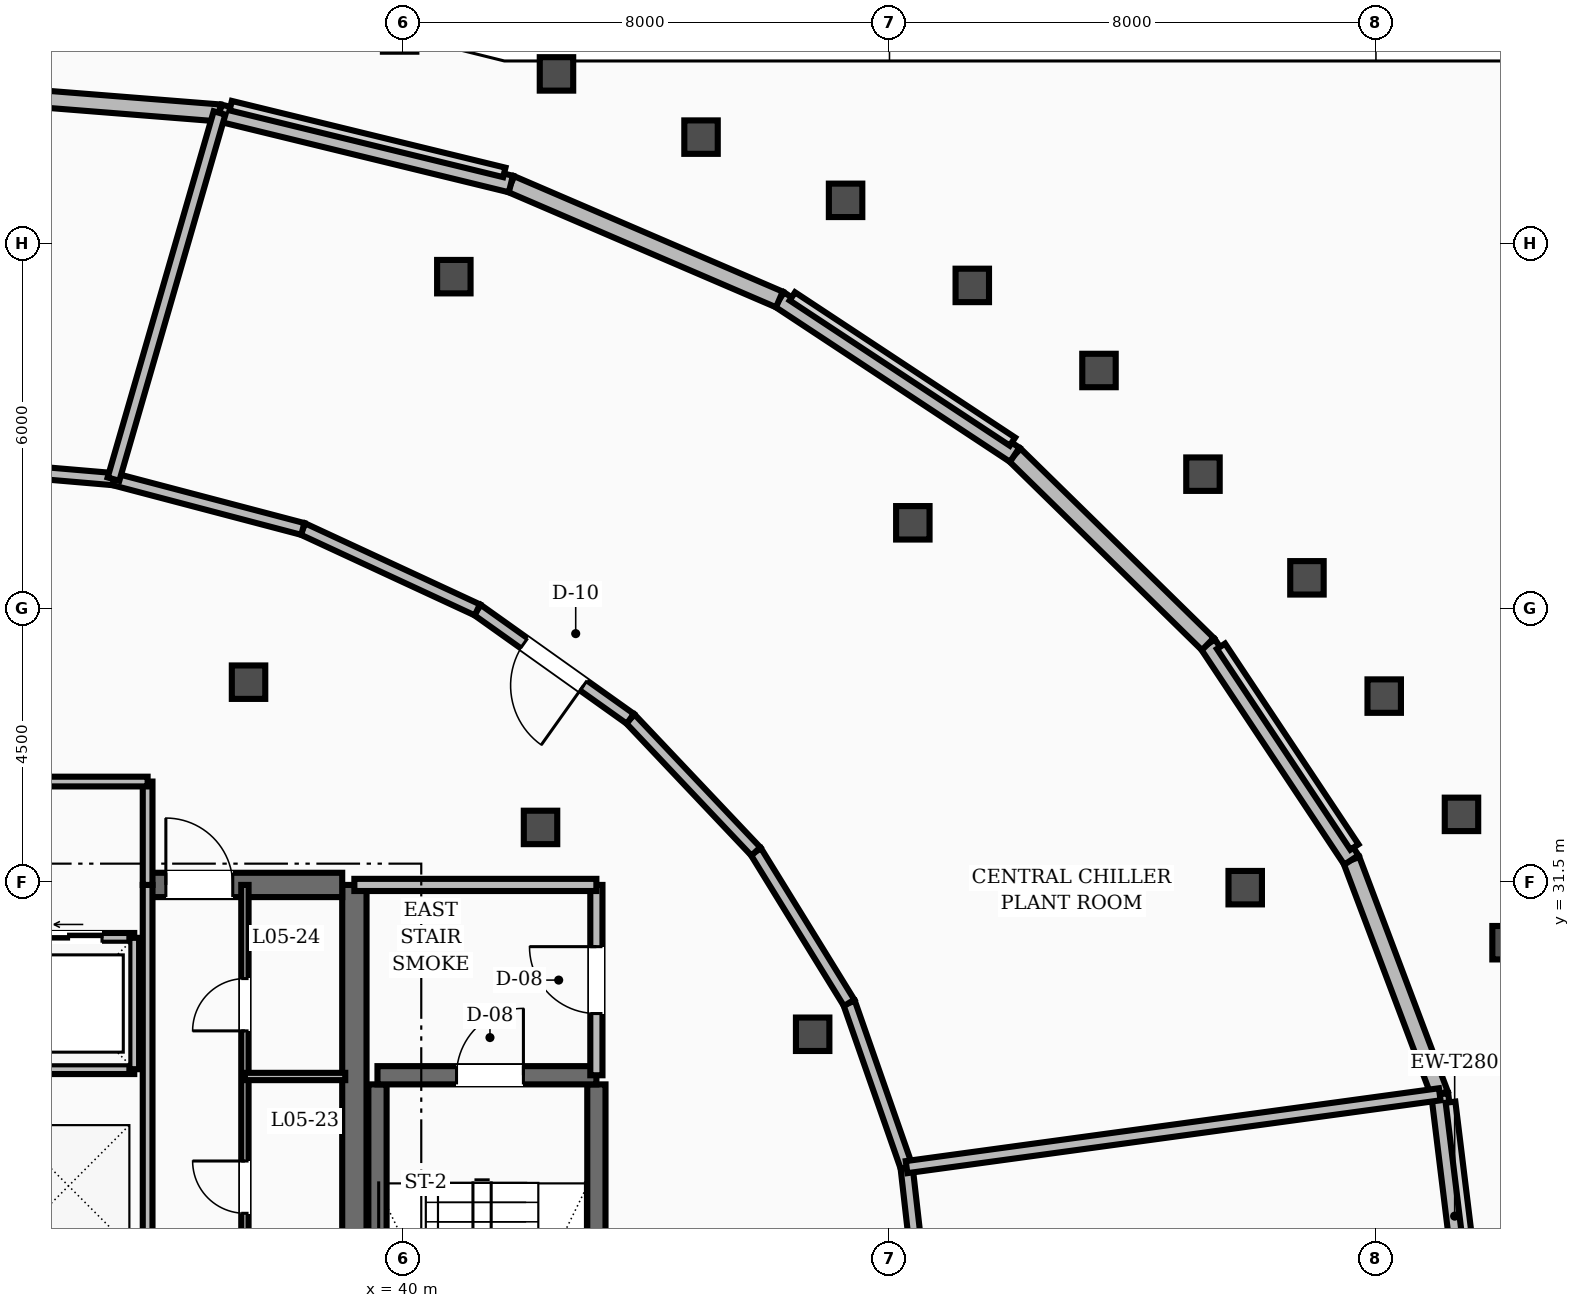
"""IFC4 building model, lengths in metres.
Left out: names, types, materials, properties, quantities, classifications, styles, units other than length and angle.
Written with IfcOpenShell. Run it as: python <this file> out.ifc"""

import sys

from ifc_helpers import new_model, si_unit, direction, frame, frame_2d, origin, place, context, subcontext, project, spatial, rectangle, extrude, element, fill, save


model = new_model("IFC4")
c1 = context("Model", 3, precision=1e-05, world=origin(), true_north=direction((0.0, 1.0)))
c2 = subcontext(c1, "Body", "Model", "MODEL_VIEW")
j1 = project(units=[si_unit("LENGTHUNIT", "METRE"), si_unit("PLANEANGLEUNIT", "RADIAN")], contexts=[c1])
p1 = place(None, origin())
s1 = spatial("IfcSite", under=j1, at=p1, CompositionType="ELEMENT")
p2 = place(p1, origin())
s2 = spatial("IfcBuilding", under=s1, at=p2, CompositionType="ELEMENT")
p3 = place(p2, frame((0.0, 0.0, 24.4)))
s3 = spatial("IfcBuildingStorey", under=s2, at=p3, CompositionType="ELEMENT", Elevation=24.4)
p4 = place(p3, frame((39.2, 25.15, 0.0), z_axis=(0.0, 0.0, 1.0), x_axis=(0.0, 1.0, 0.0)))
e1 = element("IfcWall", 1, at=p4, inside=s3, PredefinedType="SHEAR", context=c2, shape_type="SweptSolid", body=[
    extrude(rectangle(XDim=6.3, YDim=0.4, at=frame_2d((3.15, 0.0))), origin(), (0.0, 0.0, 1.0), 6.0),
])
p5 = place(p3, frame((35.8, 31.45, 0.0), z_axis=(0.0, 0.0, 1.0), x_axis=(1.0, 0.0, 0.0)))
e2 = element("IfcWall", 2, at=p5, inside=s3, PredefinedType="SHEAR", context=c2, shape_type="SweptSolid", body=[
    extrude(rectangle(XDim=3.2, YDim=0.4, at=frame_2d((1.6, 0.0))), origin(), (0.0, 0.0, 1.0), 6.0),
])
p6 = place(p5, frame((0.3, 0.0, 0.0)))
e3 = element("IfcOpeningElement", 3, at=p6, cuts=e2, PredefinedType="OPENING", context=c2, shape_type="SweptSolid", body=[
    extrude(rectangle(XDim=1.1, YDim=2.1, at=frame_2d((0.55, 1.05))), frame((0.0, 0.21, 0.0), z_axis=(0.0, -1.0, 0.0), x_axis=(1.0, 0.0, 0.0)), (0.0, 0.0, 1.0), 0.42),
])
for number, where, z_axis, x_axis in (
    (4, (43.18, 19.43, 0.0), (0.0, 0.0, 1.0), (0.0, 1.0, 0.0)),
    (5, (39.58, 19.43, 0.0), (0.0, 0.0, 1.0), (0.0, 1.0, 0.0)),
):
    element("IfcWall", number, at=place(p3, frame(where, z_axis=z_axis, x_axis=x_axis)), inside=s3, PredefinedType="SHEAR", context=c2, shape_type="SweptSolid", body=[
        extrude(rectangle(XDim=8.74, YDim=0.3, at=frame_2d((4.37, 0.0))), origin(), (0.0, 0.0, 1.0), 6.0),
    ])
p7 = place(p3, frame((39.58, 28.32, 0.0), z_axis=(0.0, 0.0, 1.0), x_axis=(1.0, 0.0, 0.0)))
e6 = element("IfcWall", 6, at=p7, inside=s3, PredefinedType="SHEAR", context=c2, shape_type="SweptSolid", body=[
    extrude(rectangle(XDim=3.6, YDim=0.3, at=frame_2d((1.8, 0.0))), origin(), (0.0, 0.0, 1.0), 6.0),
])
p8 = place(p7, frame((1.3, 0.0, 0.0)))
e7 = element("IfcOpeningElement", 7, at=p8, cuts=e6, PredefinedType="OPENING", context=c2, shape_type="SweptSolid", body=[
    extrude(rectangle(XDim=1.1, YDim=2.1, at=frame_2d((0.55, 1.05))), frame((0.0, 0.16, 0.0), z_axis=(0.0, -1.0, 0.0), x_axis=(1.0, 0.0, 0.0)), (0.0, 0.0, 1.0), 0.32),
])
p9 = place(p3, frame((57.54, 24.0, 0.0), z_axis=(0.0, 0.0, 1.0), x_axis=(-0.121555781987, 0.992584601868, 0.0)))
e8 = element("IfcWall", 8, at=p9, inside=s3, PredefinedType="STANDARD", context=c2, shape_type="SweptSolid", body=[
    extrude(rectangle(XDim=4.037, YDim=0.28, at=frame_2d((2.019, 0.0))), origin(), (0.0, 0.0, 1.0), 4.71),
])
p10 = place(p3, frame((57.049, 28.007, 0.0), z_axis=(0.0, 0.0, 1.0), x_axis=(-0.352909401731, 0.935657498324, 0.0)))
e9 = element("IfcWall", 9, at=p10, inside=s3, PredefinedType="STANDARD", context=c2, shape_type="SweptSolid", body=[
    extrude(rectangle(XDim=4.118, YDim=0.28, at=frame_2d((2.059, 0.0))), origin(), (0.0, 0.0, 1.0), 4.71),
])
p11 = place(p3, frame((55.596, 31.86, 0.0), z_axis=(0.0, 0.0, 1.0), x_axis=(-0.55356334222, 0.832807076189, 0.0)))
e10 = element("IfcWall", 10, at=p11, inside=s3, PredefinedType="STANDARD", context=c2, shape_type="SweptSolid", body=[
    extrude(rectangle(XDim=4.264, YDim=0.28, at=frame_2d((2.132, 0.0))), origin(), (0.0, 0.0, 1.0), 4.71),
])
p12 = place(p3, frame((53.236, 35.411, 0.0), z_axis=(0.0, 0.0, 1.0), x_axis=(-0.714207899037, 0.699933623248, 0.0)))
e11 = element("IfcWall", 11, at=p12, inside=s3, PredefinedType="STANDARD", context=c2, shape_type="SweptSolid", body=[
    extrude(rectangle(XDim=4.447, YDim=0.28, at=frame_2d((2.224, 0.0))), origin(), (0.0, 0.0, 1.0), 4.71),
])
p13 = place(p3, frame((50.06, 38.524, 0.0), z_axis=(0.0, 0.0, 1.0), x_axis=(-0.834608922487, 0.550842941776, 0.0)))
e12 = element("IfcWall", 12, at=p13, inside=s3, PredefinedType="STANDARD", context=c2, shape_type="SweptSolid", body=[
    extrude(rectangle(XDim=4.637, YDim=0.28, at=frame_2d((2.319, 0.0))), origin(), (0.0, 0.0, 1.0), 4.71),
])
p14 = place(p3, frame((46.189, 41.078, 0.0), z_axis=(0.0, 0.0, 1.0), x_axis=(-0.918705683067, 0.394942866629, 0.0)))
e13 = element("IfcWall", 13, at=p14, inside=s3, PredefinedType="STANDARD", context=c2, shape_type="SweptSolid", body=[
    extrude(rectangle(XDim=4.806, YDim=0.28, at=frame_2d((2.403, 0.0))), origin(), (0.0, 0.0, 1.0), 4.71),
])
p15 = place(p3, frame((41.774, 42.977, 0.0), z_axis=(0.0, 0.0, 1.0), x_axis=(-0.97151283312, 0.236986951292, 0.0)))
e14 = element("IfcWall", 14, at=p15, inside=s3, PredefinedType="STANDARD", context=c2, shape_type="SweptSolid", body=[
    extrude(rectangle(XDim=4.931, YDim=0.28, at=frame_2d((2.466, 0.0))), origin(), (0.0, 0.0, 1.0), 4.71),
])
p16 = place(p3, frame((36.983, 44.145, 0.0), z_axis=(0.0, 0.0, 1.0), x_axis=(-0.996876023292, 0.078982239682, 0.0)))
e15 = element("IfcWall", 15, at=p16, inside=s3, PredefinedType="STANDARD", context=c2, shape_type="SweptSolid", body=[
    extrude(rectangle(XDim=4.998, YDim=0.28, at=frame_2d((2.499, 0.0))), origin(), (0.0, 0.0, 1.0), 4.71),
])
p17 = place(p3, frame((43.18, 28.32, 0.0), z_axis=(0.0, 0.0, 1.0), x_axis=(0.0, 1.0, 0.0)))
e16 = element("IfcWall", 16, at=p17, inside=s3, PredefinedType="SOLIDWALL", context=c2, shape_type="SweptSolid", body=[
    extrude(rectangle(XDim=3.13, YDim=0.2, at=frame_2d((1.565, 0.0))), origin(), (0.0, 0.0, 1.0), 4.71),
])
p18 = place(p17, frame((1.015, 0.0, 0.0)))
e17 = element("IfcOpeningElement", 17, at=p18, cuts=e16, PredefinedType="OPENING", context=c2, shape_type="SweptSolid", body=[
    extrude(rectangle(XDim=1.1, YDim=2.1, at=frame_2d((0.55, 1.05))), frame((0.0, 0.11, 0.0), z_axis=(0.0, -1.0, 0.0), x_axis=(1.0, 0.0, 0.0)), (0.0, 0.0, 1.0), 0.22),
])
p19 = place(p3, frame((39.2, 31.45, 0.0), z_axis=(0.0, 0.0, 1.0), x_axis=(1.0, 0.0, 0.0)))
e18 = element("IfcWall", 18, at=p19, inside=s3, PredefinedType="SOLIDWALL", context=c2, shape_type="SweptSolid", body=[
    extrude(rectangle(XDim=3.98, YDim=0.2, at=frame_2d((1.99, 0.0))), origin(), (0.0, 0.0, 1.0), 4.71),
])
p20 = place(p3, frame((35.8, 25.25, 0.0), z_axis=(0.0, 0.0, 1.0), x_axis=(0.0, 1.0, 0.0)))
e19 = element("IfcWall", 19, at=p20, inside=s3, PredefinedType="SOLIDWALL", context=c2, shape_type="SweptSolid", body=[
    extrude(rectangle(XDim=6.2, YDim=0.16, at=frame_2d((3.1, 0.0))), origin(), (0.0, 0.0, 1.0), 4.71),
])
p21 = place(p3, frame((28.42, 30.58, 0.0), z_axis=(0.0, 0.0, 1.0), x_axis=(1.0, 0.0, 0.0)))
e20 = element("IfcWall", 20, at=p21, inside=s3, PredefinedType="SOLIDWALL", context=c2, shape_type="SweptSolid", body=[
    extrude(rectangle(XDim=7.16, YDim=0.16, at=frame_2d((3.58, 0.0))), origin(), (0.0, 0.0, 1.0), 4.71),
])
p22 = place(p21, frame((0.53, 0.0, 0.0)))
e21 = element("IfcOpeningElement", 21, at=p22, cuts=e20, PredefinedType="OPENING", context=c2, shape_type="SweptSolid", body=[
    extrude(rectangle(XDim=1.1, YDim=2.15, at=frame_2d((0.55, 1.075))), frame((0.0, 0.09, 0.0), z_axis=(0.0, -1.0, 0.0), x_axis=(1.0, 0.0, 0.0)), (0.0, 0.0, 1.0), 0.18),
])
p23 = place(p21, frame((3.03, 0.0, 0.0)))
e22 = element("IfcOpeningElement", 22, at=p23, cuts=e20, PredefinedType="OPENING", context=c2, shape_type="SweptSolid", body=[
    extrude(rectangle(XDim=1.1, YDim=2.15, at=frame_2d((0.55, 1.075))), frame((0.0, 0.09, 0.0), z_axis=(0.0, -1.0, 0.0), x_axis=(1.0, 0.0, 0.0)), (0.0, 0.0, 1.0), 0.18),
])
p24 = place(p21, frame((5.53, 0.0, 0.0)))
e23 = element("IfcOpeningElement", 23, at=p24, cuts=e20, PredefinedType="OPENING", context=c2, shape_type="SweptSolid", body=[
    extrude(rectangle(XDim=1.1, YDim=2.15, at=frame_2d((0.55, 1.075))), frame((0.0, 0.09, 0.0), z_axis=(0.0, -1.0, 0.0), x_axis=(1.0, 0.0, 0.0)), (0.0, 0.0, 1.0), 0.18),
])
p25 = place(p3, frame((28.42, 28.42, 0.0), z_axis=(0.0, 0.0, 1.0), x_axis=(1.0, 0.0, 0.0)))
e24 = element("IfcWall", 24, at=p25, inside=s3, PredefinedType="SOLIDWALL", context=c2, shape_type="SweptSolid", body=[
    extrude(rectangle(XDim=7.16, YDim=0.16, at=frame_2d((3.58, 0.0))), origin(), (0.0, 0.0, 1.0), 4.71),
])
p26 = place(p3, frame((35.58, 28.42, 0.0), z_axis=(0.0, 0.0, 1.0), x_axis=(0.0, 1.0, 0.0)))
e25 = element("IfcWall", 25, at=p26, inside=s3, PredefinedType="SOLIDWALL", context=c2, shape_type="SweptSolid", body=[
    extrude(rectangle(XDim=2.16, YDim=0.16, at=frame_2d((1.08, 0.0))), origin(), (0.0, 0.0, 1.0), 4.71),
])
p27 = place(p3, frame((35.8, 31.45, 0.0), z_axis=(0.0, 0.0, 1.0), x_axis=(0.0, 1.0, 0.0)))
e26 = element("IfcWall", 26, at=p27, inside=s3, PredefinedType="SOLIDWALL", context=c2, shape_type="SweptSolid", body=[
    extrude(rectangle(XDim=1.7, YDim=0.16, at=frame_2d((0.85, 0.0))), origin(), (0.0, 0.0, 1.0), 4.71),
])
p28 = place(p3, frame((28.2, 33.15, 0.0), z_axis=(0.0, 0.0, 1.0), x_axis=(1.0, 0.0, 0.0)))
e27 = element("IfcWall", 27, at=p28, inside=s3, PredefinedType="SOLIDWALL", context=c2, shape_type="SweptSolid", body=[
    extrude(rectangle(XDim=7.6, YDim=0.16, at=frame_2d((3.8, 0.0))), origin(), (0.0, 0.0, 1.0), 4.71),
])
p29 = place(p28, frame((3.2, 0.0, 0.0)))
e28 = element("IfcOpeningElement", 28, at=p29, cuts=e27, PredefinedType="OPENING", context=c2, shape_type="SweptSolid", body=[
    extrude(rectangle(XDim=1.2, YDim=2.1, at=frame_2d((0.6, 1.05))), frame((0.0, 0.09, 0.0), z_axis=(0.0, -1.0, 0.0), x_axis=(1.0, 0.0, 0.0)), (0.0, 0.0, 1.0), 0.18),
])
p30 = place(p3, frame((37.4, 25.25, 0.0), z_axis=(0.0, 0.0, 1.0), x_axis=(0.0, 1.0, 0.0)))
e29 = element("IfcWall", 29, at=p30, inside=s3, PredefinedType="PARTITIONING", context=c2, shape_type="SweptSolid", body=[
    extrude(rectangle(XDim=6.2, YDim=0.12, at=frame_2d((3.1, 0.0))), origin(), (0.0, 0.0, 1.0), 4.71),
])
p31 = place(p30, frame((0.8, 0.0, 0.0)))
e30 = element("IfcOpeningElement", 30, at=p31, cuts=e29, PredefinedType="OPENING", context=c2, shape_type="SweptSolid", body=[
    extrude(rectangle(XDim=0.86, YDim=2.1, at=frame_2d((0.43, 1.05))), frame((0.0, 0.07, 0.0), z_axis=(0.0, -1.0, 0.0), x_axis=(1.0, 0.0, 0.0)), (0.0, 0.0, 1.0), 0.14),
])
p32 = place(p30, frame((3.8, 0.0, 0.0)))
e31 = element("IfcOpeningElement", 31, at=p32, cuts=e29, PredefinedType="OPENING", context=c2, shape_type="SweptSolid", body=[
    extrude(rectangle(XDim=0.86, YDim=2.1, at=frame_2d((0.43, 1.05))), frame((0.0, 0.07, 0.0), z_axis=(0.0, -1.0, 0.0), x_axis=(1.0, 0.0, 0.0)), (0.0, 0.0, 1.0), 0.14),
])
p33 = place(p3, frame((37.4, 28.3, 0.0), z_axis=(0.0, 0.0, 1.0), x_axis=(1.0, 0.0, 0.0)))
e32 = element("IfcWall", 32, at=p33, inside=s3, PredefinedType="PARTITIONING", context=c2, shape_type="SweptSolid", body=[
    extrude(rectangle(XDim=1.65, YDim=0.12, at=frame_2d((0.825, 0.0))), origin(), (0.0, 0.0, 1.0), 4.71),
])
p34 = place(p3, frame((48.6, 24.0, 0.0), z_axis=(0.0, 0.0, 1.0), x_axis=(-0.112857376865, 0.993611197847, 0.0)))
e33 = element("IfcWall", 33, at=p34, inside=s3, PredefinedType="SOLIDWALL", context=c2, shape_type="SweptSolid", body=[
    extrude(rectangle(XDim=2.827, YDim=0.2, at=frame_2d((1.414, 0.0))), origin(), (0.0, 0.0, 1.0), 4.71),
])
p35 = place(p3, frame((48.281, 26.809, 0.0), z_axis=(0.0, 0.0, 1.0), x_axis=(-0.330091990738, 0.943948768552, 0.0)))
e34 = element("IfcWall", 34, at=p35, inside=s3, PredefinedType="SOLIDWALL", context=c2, shape_type="SweptSolid", body=[
    extrude(rectangle(XDim=2.862, YDim=0.2, at=frame_2d((1.431, 0.0))), origin(), (0.0, 0.0, 1.0), 4.71),
])
p36 = place(p3, frame((47.336, 29.51, 0.0), z_axis=(0.0, 0.0, 1.0), x_axis=(-0.524539864295, 0.851385888282, 0.0)))
e35 = element("IfcWall", 35, at=p36, inside=s3, PredefinedType="SOLIDWALL", context=c2, shape_type="SweptSolid", body=[
    extrude(rectangle(XDim=2.924, YDim=0.2, at=frame_2d((1.462, 0.0))), origin(), (0.0, 0.0, 1.0), 4.71),
])
p37 = place(p3, frame((45.802, 32.0, 0.0), z_axis=(0.0, 0.0, 1.0), x_axis=(-0.687248541225, 0.726422358263, 0.0)))
e36 = element("IfcWall", 36, at=p37, inside=s3, PredefinedType="SOLIDWALL", context=c2, shape_type="SweptSolid", body=[
    extrude(rectangle(XDim=3.004, YDim=0.2, at=frame_2d((1.502, 0.0))), origin(), (0.0, 0.0, 1.0), 4.71),
])
p38 = place(p3, frame((43.738, 34.182, 0.0), z_axis=(0.0, 0.0, 1.0), x_axis=(-0.814667287654, 0.579928625286, 0.0)))
e37 = element("IfcWall", 37, at=p38, inside=s3, PredefinedType="SOLIDWALL", context=c2, shape_type="SweptSolid", body=[
    extrude(rectangle(XDim=3.088, YDim=0.2, at=frame_2d((1.544, 0.0))), origin(), (0.0, 0.0, 1.0), 4.71),
])
p39 = place(p38, frame((0.944, 0.0, 0.0)))
e38 = element("IfcOpeningElement", 38, at=p39, cuts=e37, PredefinedType="OPENING", context=c2, shape_type="SweptSolid", body=[
    extrude(rectangle(XDim=1.2, YDim=2.1, at=frame_2d((0.6, 1.05))), frame((0.0, 0.11, 0.0), z_axis=(0.0, -1.0, 0.0), x_axis=(1.0, 0.0, 0.0)), (0.0, 0.0, 1.0), 0.22),
])
p40 = place(p3, frame((41.222, 35.973, 0.0), z_axis=(0.0, 0.0, 1.0), x_axis=(-0.907205736671, 0.420687236971, 0.0)))
e39 = element("IfcWall", 39, at=p40, inside=s3, PredefinedType="SOLIDWALL", context=c2, shape_type="SweptSolid", body=[
    extrude(rectangle(XDim=3.163, YDim=0.2, at=frame_2d((1.582, 0.0))), origin(), (0.0, 0.0, 1.0), 4.71),
])
p41 = place(p3, frame((38.353, 37.304, 0.0), z_axis=(0.0, 0.0, 1.0), x_axis=(-0.967085339773, 0.2544522462, 0.0)))
e40 = element("IfcWall", 40, at=p41, inside=s3, PredefinedType="SOLIDWALL", context=c2, shape_type="SweptSolid", body=[
    extrude(rectangle(XDim=3.22, YDim=0.2, at=frame_2d((1.61, 0.0))), origin(), (0.0, 0.0, 1.0), 4.71),
])
p42 = place(p3, frame((35.239, 38.123, 0.0), z_axis=(0.0, 0.0, 1.0), x_axis=(-0.996372169556, 0.085102877354, 0.0)))
e41 = element("IfcWall", 41, at=p42, inside=s3, PredefinedType="SOLIDWALL", context=c2, shape_type="SweptSolid", body=[
    extrude(rectangle(XDim=3.25, YDim=0.2, at=frame_2d((1.625, 0.0))), origin(), (0.0, 0.0, 1.0), 4.71),
])
p43 = place(p3, frame((48.281, 26.809, 0.0), z_axis=(0.0, 0.0, 1.0), x_axis=(0.990798748828, 0.13534341255, 0.0)))
e42 = element("IfcWall", 42, at=p43, inside=s3, PredefinedType="SOLIDWALL", context=c2, shape_type="SweptSolid", body=[
    extrude(rectangle(XDim=8.85, YDim=0.2, at=frame_2d((4.425, 0.0))), origin(), (0.0, 0.0, 1.0), 4.71),
])
p44 = place(p3, frame((35.239, 38.123, 0.0), z_axis=(0.0, 0.0, 1.0), x_axis=(0.278196122184, 0.960524293083, 0.0)))
e43 = element("IfcWall", 43, at=p44, inside=s3, PredefinedType="SOLIDWALL", context=c2, shape_type="SweptSolid", body=[
    extrude(rectangle(XDim=6.27, YDim=0.2, at=frame_2d((3.135, 0.0))), origin(), (0.0, 0.0, 1.0), 4.71),
])
p45 = place(p8, origin())
e44 = element("IfcDoor", 44, at=p45, inside=s3, OperationType="SINGLE_SWING_RIGHT", PredefinedType="DOOR", context=c2, shape_type="SweptSolid", body=[
    extrude(rectangle(XDim=1.1, YDim=2.1, at=frame_2d((0.55, 1.05))), frame((0.0, 0.025, 0.0), z_axis=(0.0, -1.0, 0.0), x_axis=(1.0, 0.0, 0.0)), (0.0, 0.0, 1.0), 0.05),
])
fill(e7, e44)
p46 = place(p18, origin())
e45 = element("IfcDoor", 45, at=p46, inside=s3, OperationType="SINGLE_SWING_RIGHT", PredefinedType="DOOR", context=c2, shape_type="SweptSolid", body=[
    extrude(rectangle(XDim=1.1, YDim=2.1, at=frame_2d((0.55, 1.05))), frame((0.0, 0.025, 0.0), z_axis=(0.0, -1.0, 0.0), x_axis=(1.0, 0.0, 0.0)), (0.0, 0.0, 1.0), 0.05),
])
fill(e17, e45)
p47 = place(p6, origin())
e46 = element("IfcDoor", 46, at=p47, inside=s3, OperationType="SINGLE_SWING_LEFT", PredefinedType="DOOR", context=c2, shape_type="SweptSolid", body=[
    extrude(rectangle(XDim=1.1, YDim=2.1, at=frame_2d((0.55, 1.05))), frame((0.0, 0.025, 0.0), z_axis=(0.0, -1.0, 0.0), x_axis=(1.0, 0.0, 0.0)), (0.0, 0.0, 1.0), 0.05),
])
fill(e3, e46)
p48 = place(p24, origin())
e47 = element("IfcDoor", 47, at=p48, inside=s3, OperationType="SLIDING_TO_LEFT", PredefinedType="DOOR", context=c2, shape_type="SweptSolid", body=[
    extrude(rectangle(XDim=1.1, YDim=2.15, at=frame_2d((0.55, 1.075))), frame((0.0, 0.025, 0.0), z_axis=(0.0, -1.0, 0.0), x_axis=(1.0, 0.0, 0.0)), (0.0, 0.0, 1.0), 0.05),
])
fill(e23, e47)
p49 = place(p31, origin())
e48 = element("IfcDoor", 48, at=p49, inside=s3, OperationType="SINGLE_SWING_RIGHT", PredefinedType="DOOR", context=c2, shape_type="SweptSolid", body=[
    extrude(rectangle(XDim=0.86, YDim=2.1, at=frame_2d((0.43, 1.05))), frame((0.0, 0.025, 0.0), z_axis=(0.0, -1.0, 0.0), x_axis=(1.0, 0.0, 0.0)), (0.0, 0.0, 1.0), 0.05),
])
fill(e30, e48)
p50 = place(p32, origin())
e49 = element("IfcDoor", 49, at=p50, inside=s3, OperationType="SINGLE_SWING_LEFT", PredefinedType="DOOR", context=c2, shape_type="SweptSolid", body=[
    extrude(rectangle(XDim=0.86, YDim=2.1, at=frame_2d((0.43, 1.05))), frame((0.0, 0.025, 0.0), z_axis=(0.0, -1.0, 0.0), x_axis=(1.0, 0.0, 0.0)), (0.0, 0.0, 1.0), 0.05),
])
fill(e31, e49)
p51 = place(p39, origin())
e50 = element("IfcDoor", 50, at=p51, inside=s3, OperationType="SINGLE_SWING_LEFT", PredefinedType="DOOR", context=c2, shape_type="SweptSolid", body=[
    extrude(rectangle(XDim=1.2, YDim=2.1, at=frame_2d((0.6, 1.05))), frame((0.0, 0.025, 0.0), z_axis=(0.0, -1.0, 0.0), x_axis=(1.0, 0.0, 0.0)), (0.0, 0.0, 1.0), 0.05),
])
fill(e38, e50)
save(model, sys.argv[1])
